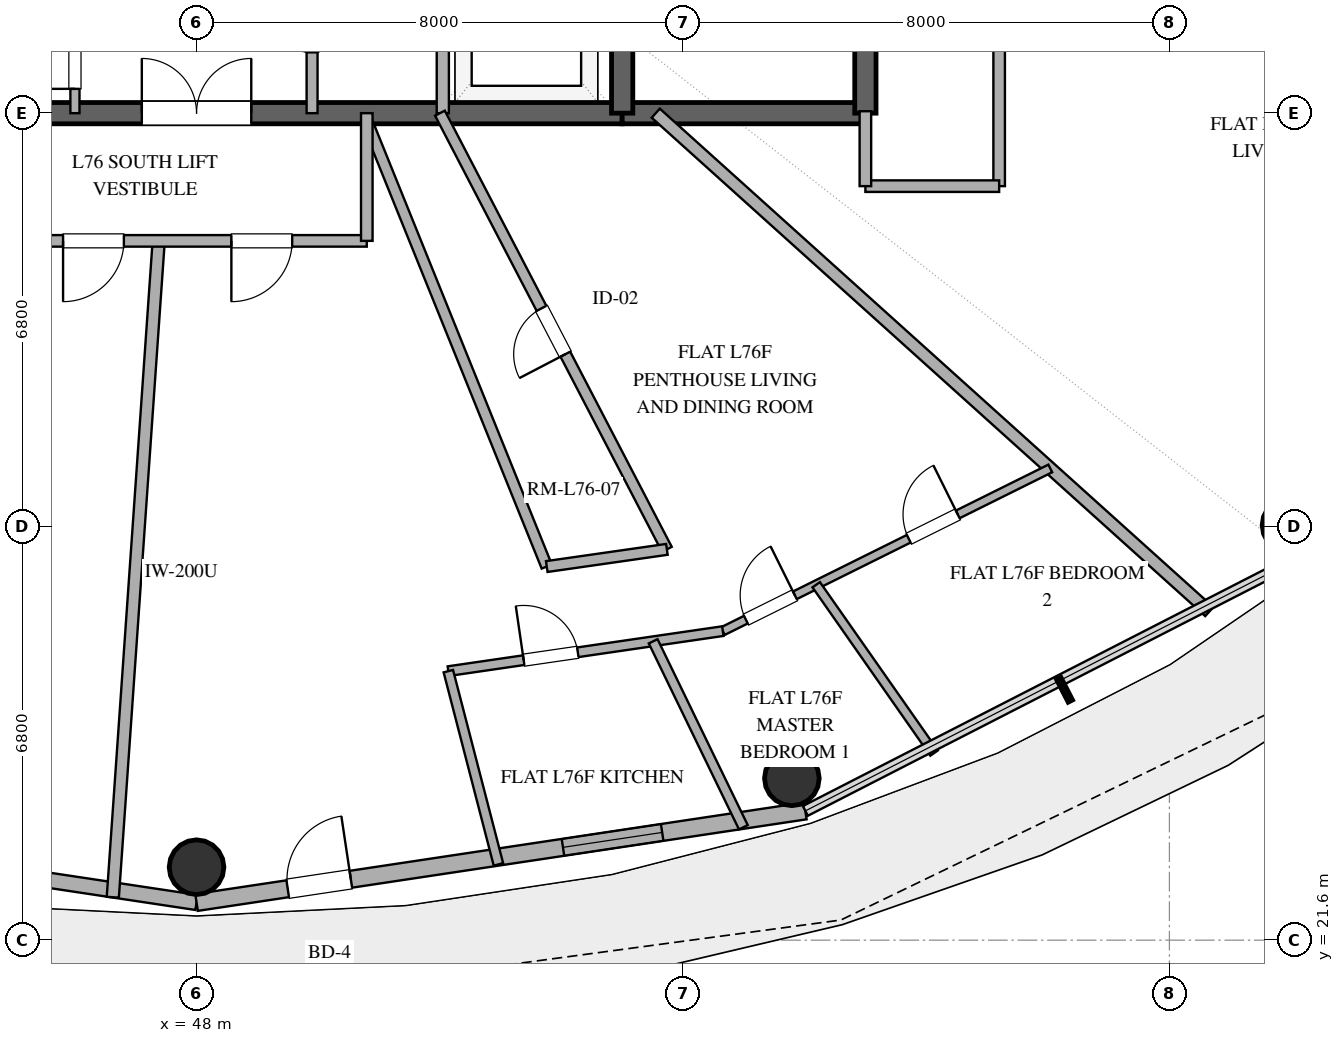
"""IFC4 building model, lengths in metres.
Left out: names, types, materials, properties, quantities, classifications, styles, units other than length and angle.
Written with IfcOpenShell. Run it as: python <this file> out.ifc"""

import sys

from ifc_helpers import new_model, si_unit, direction, frame, frame_2d, origin, origin_2d, place, context, subcontext, project, spatial, rectangle, hollow_circle, extrude, element, fill, save


model = new_model("IFC4")
c1 = context("Model", 3, precision=1e-05, world=origin(), true_north=direction((0.0, 1.0)))
c2 = subcontext(c1, "Body", "Model", "MODEL_VIEW")
j1 = project(units=[si_unit("LENGTHUNIT", "METRE"), si_unit("PLANEANGLEUNIT", "RADIAN")], contexts=[c1])
p1 = place(None, origin())
s1 = spatial("IfcSite", under=j1, at=p1, CompositionType="ELEMENT")
p2 = place(p1, origin())
s2 = spatial("IfcBuilding", under=s1, at=p2, CompositionType="ELEMENT")
p3 = place(p2, frame((0.0, 0.0, 294.6)))
s3 = spatial("IfcBuildingStorey", under=s2, at=p3, CompositionType="ELEMENT", Elevation=294.6)
p4 = place(p3, frame((41.0, 35.2, 0.0), z_axis=(0.0, 0.0, 1.0), x_axis=(1.0, 0.0, 0.0)))
e1 = element("IfcWall", 1, at=p4, inside=s3, PredefinedType="SHEAR", context=c2, shape_type="SweptSolid", body=[
    extrude(rectangle(XDim=14.0, YDim=0.35, at=frame_2d((7.0, 0.0))), origin(), (0.0, 0.0, 1.0), 3.37),
])
p5 = place(p4, frame((6.1, 0.0, 0.0)))
e2 = element("IfcOpeningElement", 2, at=p5, cuts=e1, PredefinedType="OPENING", context=c2, shape_type="SweptSolid", body=[
    extrude(rectangle(XDim=1.8, YDim=2.25, at=frame_2d((0.9, 1.125))), frame((0.0, 0.185, 0.0), z_axis=(0.0, -1.0, 0.0), x_axis=(1.0, 0.0, 0.0)), (0.0, 0.0, 1.0), 0.37),
])
p6 = place(p3, frame((55.0, 35.2, 0.0), z_axis=(0.0, 0.0, 1.0), x_axis=(1.0, 0.0, 0.0)))
e3 = element("IfcWall", 3, at=p6, inside=s3, PredefinedType="SHEAR", context=c2, shape_type="SweptSolid", body=[
    extrude(rectangle(XDim=4.0, YDim=0.35, at=frame_2d((2.0, 0.0))), origin(), (0.0, 0.0, 1.0), 3.37),
])
p7 = place(p3, frame((59.0, 35.2, 0.0), z_axis=(0.0, 0.0, 1.0), x_axis=(0.0, 1.0, 0.0)))
e4 = element("IfcWall", 4, at=p7, inside=s3, PredefinedType="SHEAR", context=c2, shape_type="SweptSolid", body=[
    extrude(rectangle(XDim=13.6, YDim=0.35, at=frame_2d((6.8, 0.0))), origin(), (0.0, 0.0, 1.0), 3.37),
])
p8 = place(p7, frame((1.5, 0.0, 0.0)))
e5 = element("IfcOpeningElement", 5, at=p8, cuts=e4, PredefinedType="OPENING", context=c2, shape_type="SweptSolid", body=[
    extrude(rectangle(XDim=1.2, YDim=2.15, at=frame_2d((0.6, 1.075))), frame((0.0, 0.185, 0.0), z_axis=(0.0, -1.0, 0.0), x_axis=(1.0, 0.0, 0.0)), (0.0, 0.0, 1.0), 0.37),
])
p9 = place(p3, frame((55.0, 35.2, 0.0), z_axis=(0.0, 0.0, 1.0), x_axis=(0.0, 1.0, 0.0)))
e6 = element("IfcWall", 6, at=p9, inside=s3, PredefinedType="SHEAR", context=c2, shape_type="SweptSolid", body=[
    extrude(rectangle(XDim=13.6, YDim=0.35, at=frame_2d((6.8, 0.0))), origin(), (0.0, 0.0, 1.0), 3.37),
])
p10 = place(p9, frame((1.15, 0.0, 0.0)))
e7 = element("IfcOpeningElement", 7, at=p10, cuts=e6, PredefinedType="OPENING", context=c2, shape_type="SweptSolid", body=[
    extrude(rectangle(XDim=1.1, YDim=2.2, at=frame_2d((0.55, 1.1))), frame((0.0, 0.185, 0.0), z_axis=(0.0, -1.0, 0.0), x_axis=(1.0, 0.0, 0.0)), (0.0, 0.0, 1.0), 0.37),
])
for number, where, z_axis, x_axis in (
    (8, (48.0, 22.8, 0.0), (0.0, 0.0, 1.0), (1.0, 0.0, 0.0)),
    (9, (57.791, 24.261, 0.0), (0.0, 0.0, 1.0), (1.0, 0.0, 0.0)),
    (10, (65.975, 28.424, 0.0), (0.0, 0.0, 1.0), (1.0, 0.0, 0.0)),
):
    element("IfcColumn", number, at=place(p3, frame(where, z_axis=z_axis, x_axis=x_axis)), inside=s3, PredefinedType="COLUMN", context=c2, shape_type="SweptSolid", body=[
        extrude(hollow_circle(Radius=0.45, WallThickness=0.025, at=origin_2d()), origin(), (0.0, 0.0, 1.0), 3.37),
    ])
p11 = place(p3, frame((37.987, 23.726, 0.0), z_axis=(0.0, 0.0, 1.0), x_axis=(0.988882522213, -0.148698881169, 0.0)))
e11 = element("IfcWall", 11, at=p11, inside=s3, PredefinedType="SOLIDWALL", context=c2, shape_type="SweptSolid", body=[
    extrude(rectangle(XDim=10.125, YDim=0.25, at=frame_2d((5.062, 0.0))), origin(), (0.0, 0.0, 1.0), 3.37),
])
p12 = place(p3, frame((48.0, 22.22, 0.0), z_axis=(0.0, 0.0, 1.0), x_axis=(0.988882522213, 0.148698881169, 0.0)))
e12 = element("IfcWall", 12, at=p12, inside=s3, PredefinedType="SOLIDWALL", context=c2, shape_type="SweptSolid", body=[
    extrude(rectangle(XDim=10.125, YDim=0.28, at=frame_2d((5.062, 0.0))), origin(), (0.0, 0.0, 1.0), 3.37),
])
p13 = place(p12, frame((1.516, 0.0, 0.0)))
e13 = element("IfcOpeningElement", 13, at=p13, cuts=e12, PredefinedType="OPENING", context=c2, shape_type="SweptSolid", body=[
    extrude(rectangle(XDim=1.05, YDim=2.2, at=frame_2d((0.525, 1.1))), frame((0.0, 0.15, 0.0), z_axis=(0.0, -1.0, 0.0), x_axis=(1.0, 0.0, 0.0)), (0.0, 0.0, 1.0), 0.3),
])
p14 = place(p12, frame((6.094, 0.0, 0.85)))
e14 = element("IfcOpeningElement", 14, at=p14, cuts=e12, PredefinedType="OPENING", context=c2, shape_type="SweptSolid", body=[
    extrude(rectangle(XDim=1.65, YDim=2.0, at=frame_2d((0.825, 1.0))), frame((0.0, 0.15, 0.0), z_axis=(0.0, -1.0, 0.0), x_axis=(1.0, 0.0, 0.0)), (0.0, 0.0, 1.0), 0.3),
])
p15 = place(p3, frame((52.05, 35.2, 0.0), z_axis=(0.0, 0.0, 1.0), x_axis=(0.0, 1.0, 0.0)))
e15 = element("IfcWall", 15, at=p15, inside=s3, PredefinedType="SOLIDWALL", context=c2, shape_type="SweptSolid", body=[
    extrude(rectangle(XDim=3.2, YDim=0.2, at=frame_2d((1.6, 0.0))), origin(), (0.0, 0.0, 1.0), 2.73),
])
p16 = place(p3, frame((46.0, 35.2, 0.0), z_axis=(0.0, 0.0, 1.0), x_axis=(0.0, 1.0, 0.0)))
e16 = element("IfcWall", 16, at=p16, inside=s3, PredefinedType="PARTITIONING", context=c2, shape_type="SweptSolid", body=[
    extrude(rectangle(XDim=3.2, YDim=0.15, at=frame_2d((1.6, 0.0))), origin(), (0.0, 0.0, 1.0), 2.73),
])
p17 = place(p16, frame((0.4, 0.0, 0.0)))
e17 = element("IfcOpeningElement", 17, at=p17, cuts=e16, PredefinedType="OPENING", context=c2, shape_type="SweptSolid", body=[
    extrude(rectangle(XDim=0.85, YDim=2.15, at=frame_2d((0.425, 1.075))), frame((0.0, 0.085, 0.0), z_axis=(0.0, -1.0, 0.0), x_axis=(1.0, 0.0, 0.0)), (0.0, 0.0, 1.0), 0.17),
])
p18 = place(p16, frame((1.85, 0.0, 0.0)))
e18 = element("IfcOpeningElement", 18, at=p18, cuts=e16, PredefinedType="OPENING", context=c2, shape_type="SweptSolid", body=[
    extrude(rectangle(XDim=0.85, YDim=2.15, at=frame_2d((0.425, 1.075))), frame((0.0, 0.085, 0.0), z_axis=(0.0, -1.0, 0.0), x_axis=(1.0, 0.0, 0.0)), (0.0, 0.0, 1.0), 0.17),
])
p19 = place(p3, frame((49.9, 35.2, 0.0), z_axis=(0.0, 0.0, 1.0), x_axis=(0.0, 1.0, 0.0)))
e19 = element("IfcWall", 19, at=p19, inside=s3, PredefinedType="PLUMBINGWALL", context=c2, shape_type="SweptSolid", body=[
    extrude(rectangle(XDim=3.0, YDim=0.18, at=frame_2d((1.5, 0.0))), origin(), (0.0, 0.0, 1.0), 2.73),
])
p20 = place(p19, frame((1.0, 0.0, 0.0)))
e20 = element("IfcOpeningElement", 20, at=p20, cuts=e19, PredefinedType="OPENING", context=c2, shape_type="SweptSolid", body=[
    extrude(rectangle(XDim=0.9, YDim=2.1, at=frame_2d((0.45, 1.05))), frame((0.0, 0.1, 0.0), z_axis=(0.0, -1.0, 0.0), x_axis=(1.0, 0.0, 0.0)), (0.0, 0.0, 1.0), 0.2),
])
p21 = place(p3, frame((47.378, 33.1, 0.0), z_axis=(0.0, 0.0, 1.0), x_axis=(-0.069765360577, -0.997563428792, 0.0)))
e21 = element("IfcWall", 21, at=p21, inside=s3, PredefinedType="PARTITIONING", context=c2, shape_type="SweptSolid", body=[
    extrude(rectangle(XDim=10.82, YDim=0.2, at=frame_2d((5.41, 0.0))), origin(), (0.0, 0.0, 1.0), 2.73),
])
p22 = place(p3, frame((64.656, 27.003, 0.0), z_axis=(0.0, 0.0, 1.0), x_axis=(-0.743146474593, 0.669128774826, 0.0)))
e22 = element("IfcWall", 22, at=p22, inside=s3, PredefinedType="PARTITIONING", context=c2, shape_type="SweptSolid", body=[
    extrude(rectangle(XDim=12.25, YDim=0.2, at=frame_2d((6.125, 0.0))), origin(), (0.0, 0.0, 1.0), 2.73),
])
p23 = place(p3, frame((55.736, 28.027, 0.0), z_axis=(0.0, 0.0, 1.0), x_axis=(-0.461598928477, 0.88708873808, 0.0)))
e23 = element("IfcWall", 23, at=p23, inside=s3, PredefinedType="PLUMBINGWALL", context=c2, shape_type="SweptSolid", body=[
    extrude(rectangle(XDim=8.086, YDim=0.18, at=frame_2d((4.043, 0.0))), origin(), (0.0, 0.0, 1.0), 2.73),
])
p24 = place(p23, frame((3.618, 0.0, 0.0)))
e24 = element("IfcOpeningElement", 24, at=p24, cuts=e23, PredefinedType="OPENING", context=c2, shape_type="SweptSolid", body=[
    extrude(rectangle(XDim=0.85, YDim=2.1, at=frame_2d((0.425, 1.05))), frame((0.0, 0.1, 0.0), z_axis=(0.0, -1.0, 0.0), x_axis=(1.0, 0.0, 0.0)), (0.0, 0.0, 1.0), 0.2),
])
p25 = place(p3, frame((50.8, 35.07, 0.0), z_axis=(0.0, 0.0, 1.0), x_axis=(0.374600990238, -0.927186118378, 0.0)))
e25 = element("IfcWall", 25, at=p25, inside=s3, PredefinedType="PLUMBINGWALL", context=c2, shape_type="SweptSolid", body=[
    extrude(rectangle(XDim=7.901, YDim=0.18, at=frame_2d((3.95, 0.0))), origin(), (0.0, 0.0, 1.0), 2.73),
])
p26 = place(p3, frame((61.2, 45.252, 0.0), z_axis=(0.0, 0.0, 1.0), x_axis=(0.0, -1.0, 0.0)))
e26 = element("IfcWall", 26, at=p26, inside=s3, PredefinedType="PARTITIONING", context=c2, shape_type="SweptSolid", body=[
    extrude(rectangle(XDim=11.252, YDim=0.19, at=frame_2d((5.626, 0.0))), origin(), (0.0, 0.0, 1.0), 2.73),
])
p27 = place(p26, frame((7.871, 0.0, 0.0)))
e27 = element("IfcOpeningElement", 27, at=p27, cuts=e26, PredefinedType="OPENING", context=c2, shape_type="SweptSolid", body=[
    extrude(rectangle(XDim=1.0, YDim=2.2, at=frame_2d((0.5, 1.1))), frame((0.0, 0.105, 0.0), z_axis=(0.0, -1.0, 0.0), x_axis=(1.0, 0.0, 0.0)), (0.0, 0.0, 1.0), 0.21),
])
p28 = place(p3, frame((56.655, 26.682, 0.0), z_axis=(0.0, 0.0, 1.0), x_axis=(0.895585218268, 0.444890005304, 0.0)))
e28 = element("IfcWall", 28, at=p28, inside=s3, PredefinedType="PARTITIONING", context=c2, shape_type="SweptSolid", body=[
    extrude(rectangle(XDim=6.014, YDim=0.14, at=frame_2d((3.007, 0.0))), origin(), (0.0, 0.0, 1.0), 2.73),
])
p29 = place(p28, frame((3.415, 0.0, 0.0)))
e29 = element("IfcOpeningElement", 29, at=p29, cuts=e28, PredefinedType="OPENING", context=c2, shape_type="SweptSolid", body=[
    extrude(rectangle(XDim=0.9, YDim=2.1, at=frame_2d((0.45, 1.05))), frame((0.0, 0.08, 0.0), z_axis=(0.0, -1.0, 0.0), x_axis=(1.0, 0.0, 0.0)), (0.0, 0.0, 1.0), 0.16),
])
p30 = place(p28, frame((0.424, 0.0, 0.0)))
e30 = element("IfcOpeningElement", 30, at=p30, cuts=e28, PredefinedType="OPENING", context=c2, shape_type="SweptSolid", body=[
    extrude(rectangle(XDim=0.9, YDim=2.1, at=frame_2d((0.45, 1.05))), frame((0.0, 0.08, 0.0), z_axis=(0.0, -1.0, 0.0), x_axis=(1.0, 0.0, 0.0)), (0.0, 0.0, 1.0), 0.16),
])
p31 = place(p3, frame((50.8, 33.1, 0.0), z_axis=(0.0, 0.0, 1.0), x_axis=(-1.0, 0.0, 0.0)))
e31 = element("IfcWall", 31, at=p31, inside=s3, PredefinedType="PARTITIONING", context=c2, shape_type="SweptSolid", body=[
    extrude(rectangle(XDim=5.6, YDim=0.19, at=frame_2d((2.8, 0.0))), origin(), (0.0, 0.0, 1.0), 2.73),
])
p32 = place(p31, frame((1.227, 0.0, 0.0)))
e32 = element("IfcOpeningElement", 32, at=p32, cuts=e31, PredefinedType="OPENING", context=c2, shape_type="SweptSolid", body=[
    extrude(rectangle(XDim=1.0, YDim=2.2, at=frame_2d((0.5, 1.1))), frame((0.0, 0.105, 0.0), z_axis=(0.0, -1.0, 0.0), x_axis=(1.0, 0.0, 0.0)), (0.0, 0.0, 1.0), 0.21),
])
p33 = place(p31, frame((3.995, 0.0, 0.0)))
e33 = element("IfcOpeningElement", 33, at=p33, cuts=e31, PredefinedType="OPENING", context=c2, shape_type="SweptSolid", body=[
    extrude(rectangle(XDim=1.0, YDim=2.2, at=frame_2d((0.5, 1.1))), frame((0.0, 0.105, 0.0), z_axis=(0.0, -1.0, 0.0), x_axis=(1.0, 0.0, 0.0)), (0.0, 0.0, 1.0), 0.21),
])
p34 = place(p3, frame((52.141, 26.024, 0.0), z_axis=(0.0, 0.0, 1.0), x_axis=(0.989534254842, 0.144298158322, 0.0)))
e34 = element("IfcWall", 34, at=p34, inside=s3, PredefinedType="PLUMBINGWALL", context=c2, shape_type="SweptSolid", body=[
    extrude(rectangle(XDim=4.562, YDim=0.16, at=frame_2d((2.281, 0.0))), origin(), (0.0, 0.0, 1.0), 2.73),
])
p35 = place(p34, frame((1.252, 0.0, 0.0)))
e35 = element("IfcOpeningElement", 35, at=p35, cuts=e34, PredefinedType="OPENING", context=c2, shape_type="SweptSolid", body=[
    extrude(rectangle(XDim=0.9, YDim=2.1, at=frame_2d((0.45, 1.05))), frame((0.0, 0.09, 0.0), z_axis=(0.0, -1.0, 0.0), x_axis=(1.0, 0.0, 0.0)), (0.0, 0.0, 1.0), 0.18),
])
p36 = place(p3, frame((55.51, 26.515, 0.0), z_axis=(0.0, 0.0, 1.0), x_axis=(0.436379231312, -0.899762839019, 0.0)))
e36 = element("IfcWall", 36, at=p36, inside=s3, PredefinedType="PLUMBINGWALL", context=c2, shape_type="SweptSolid", body=[
    extrude(rectangle(XDim=3.399, YDim=0.16, at=frame_2d((1.7, 0.0))), origin(), (0.0, 0.0, 1.0), 2.73),
])
p37 = place(p3, frame((58.191, 27.445, 0.0), z_axis=(0.0, 0.0, 1.0), x_axis=(0.573559302344, -0.819164041383, 0.0)))
e37 = element("IfcWall", 37, at=p37, inside=s3, PredefinedType="PARTITIONING", context=c2, shape_type="SweptSolid", body=[
    extrude(rectangle(XDim=3.38, YDim=0.15, at=frame_2d((1.69, 0.0))), origin(), (0.0, 0.0, 1.0), 2.73),
])
p38 = place(p3, frame((52.965, 22.846, 0.0), z_axis=(0.0, 0.0, 1.0), x_axis=(-0.250907961693, 0.968010947644, 0.0)))
e38 = element("IfcWall", 38, at=p38, inside=s3, PredefinedType="PLUMBINGWALL", context=c2, shape_type="SweptSolid", body=[
    extrude(rectangle(XDim=3.283, YDim=0.16, at=frame_2d((1.642, 0.0))), origin(), (0.0, 0.0, 1.0), 2.73),
])
p39 = place(p3, frame((61.2, 34.0, 0.0), z_axis=(0.0, 0.0, 1.0), x_axis=(-1.0, 0.0, 0.0)))
e39 = element("IfcWall", 39, at=p39, inside=s3, PredefinedType="PARTITIONING", context=c2, shape_type="SweptSolid", body=[
    extrude(rectangle(XDim=2.2, YDim=0.19, at=frame_2d((1.1, 0.0))), origin(), (0.0, 0.0, 1.0), 2.73),
])
p40 = place(p3, frame((50.8, 35.2, 0.0), z_axis=(0.0, 0.0, 1.0), x_axis=(0.0, -1.0, 0.0)))
e40 = element("IfcWall", 40, at=p40, inside=s3, PredefinedType="PARTITIONING", context=c2, shape_type="SweptSolid", body=[
    extrude(rectangle(XDim=2.1, YDim=0.19, at=frame_2d((1.05, 0.0))), origin(), (0.0, 0.0, 1.0), 2.73),
])
p41 = place(p3, frame((53.76, 27.744, 0.0), z_axis=(0.0, 0.0, 1.0), x_axis=(0.989917666011, 0.141643970992, 0.0)))
e41 = element("IfcWall", 41, at=p41, inside=s3, PredefinedType="PLUMBINGWALL", context=c2, shape_type="SweptSolid", body=[
    extrude(rectangle(XDim=1.996, YDim=0.18, at=frame_2d((0.998, 0.0))), origin(), (0.0, 0.0, 1.0), 2.73),
])
p42 = place(p3, frame((59.0, 34.0, 0.0), z_axis=(0.0, 0.0, 1.0), x_axis=(0.0, 1.0, 0.0)))
e42 = element("IfcWall", 42, at=p42, inside=s3, PredefinedType="PARTITIONING", context=c2, shape_type="SweptSolid", body=[
    extrude(rectangle(XDim=1.232, YDim=0.19, at=frame_2d((0.616, 0.0))), origin(), (0.0, 0.0, 1.0), 2.73),
])
p43 = place(p13, origin())
e43 = element("IfcDoor", 43, at=p43, inside=s3, OperationType="SINGLE_SWING_RIGHT", PredefinedType="DOOR", context=c2, shape_type="SweptSolid", body=[
    extrude(rectangle(XDim=1.05, YDim=2.2, at=frame_2d((0.525, 1.1))), frame((0.0, 0.025, 0.0), z_axis=(0.0, -1.0, 0.0), x_axis=(1.0, 0.0, 0.0)), (0.0, 0.0, 1.0), 0.05),
])
fill(e13, e43)
p44 = place(p14, origin())
e44 = element("IfcWindow", 44, at=p44, inside=s3, PartitioningType="SINGLE_PANEL", PredefinedType="WINDOW", context=c2, shape_type="SweptSolid", body=[
    extrude(rectangle(XDim=1.65, YDim=2.0, at=frame_2d((0.825, 1.0))), frame((0.0, 0.03, 0.0), z_axis=(0.0, -1.0, 0.0), x_axis=(1.0, 0.0, 0.0)), (0.0, 0.0, 1.0), 0.06),
])
fill(e14, e44)
p45 = place(p5, origin())
e45 = element("IfcDoor", 45, at=p45, inside=s3, OperationType="DOUBLE_DOOR_SINGLE_SWING", PredefinedType="DOOR", context=c2, shape_type="SweptSolid", body=[
    extrude(rectangle(XDim=1.8, YDim=2.25, at=frame_2d((0.9, 1.125))), frame((0.0, 0.025, 0.0), z_axis=(0.0, -1.0, 0.0), x_axis=(1.0, 0.0, 0.0)), (0.0, 0.0, 1.0), 0.05),
])
fill(e2, e45)
p46 = place(p17, origin())
e46 = element("IfcDoor", 46, at=p46, inside=s3, OperationType="SINGLE_SWING_LEFT", PredefinedType="DOOR", context=c2, shape_type="SweptSolid", body=[
    extrude(rectangle(XDim=0.85, YDim=2.15, at=frame_2d((0.425, 1.075))), frame((0.0, 0.025, 0.0), z_axis=(0.0, -1.0, 0.0), x_axis=(1.0, 0.0, 0.0)), (0.0, 0.0, 1.0), 0.05),
])
fill(e17, e46)
p47 = place(p24, origin())
e47 = element("IfcDoor", 47, at=p47, inside=s3, OperationType="SINGLE_SWING_LEFT", PredefinedType="DOOR", context=c2, shape_type="SweptSolid", body=[
    extrude(rectangle(XDim=0.85, YDim=2.1, at=frame_2d((0.425, 1.05))), frame((0.0, 0.025, 0.0), z_axis=(0.0, -1.0, 0.0), x_axis=(1.0, 0.0, 0.0)), (0.0, 0.0, 1.0), 0.05),
])
fill(e24, e47)
p48 = place(p29, origin())
e48 = element("IfcDoor", 48, at=p48, inside=s3, OperationType="SINGLE_SWING_RIGHT", PredefinedType="DOOR", context=c2, shape_type="SweptSolid", body=[
    extrude(rectangle(XDim=0.9, YDim=2.1, at=frame_2d((0.45, 1.05))), frame((0.0, 0.025, 0.0), z_axis=(0.0, -1.0, 0.0), x_axis=(1.0, 0.0, 0.0)), (0.0, 0.0, 1.0), 0.05),
])
fill(e29, e48)
p49 = place(p30, origin())
e49 = element("IfcDoor", 49, at=p49, inside=s3, OperationType="SINGLE_SWING_RIGHT", PredefinedType="DOOR", context=c2, shape_type="SweptSolid", body=[
    extrude(rectangle(XDim=0.9, YDim=2.1, at=frame_2d((0.45, 1.05))), frame((0.0, 0.025, 0.0), z_axis=(0.0, -1.0, 0.0), x_axis=(1.0, 0.0, 0.0)), (0.0, 0.0, 1.0), 0.05),
])
fill(e30, e49)
p50 = place(p32, origin())
e50 = element("IfcDoor", 50, at=p50, inside=s3, OperationType="SINGLE_SWING_RIGHT", PredefinedType="DOOR", context=c2, shape_type="SweptSolid", body=[
    extrude(rectangle(XDim=1.0, YDim=2.2, at=frame_2d((0.5, 1.1))), frame((0.0, 0.025, 0.0), z_axis=(0.0, -1.0, 0.0), x_axis=(1.0, 0.0, 0.0)), (0.0, 0.0, 1.0), 0.05),
])
fill(e32, e50)
p51 = place(p33, origin())
e51 = element("IfcDoor", 51, at=p51, inside=s3, OperationType="SINGLE_SWING_RIGHT", PredefinedType="DOOR", context=c2, shape_type="SweptSolid", body=[
    extrude(rectangle(XDim=1.0, YDim=2.2, at=frame_2d((0.5, 1.1))), frame((0.0, 0.025, 0.0), z_axis=(0.0, -1.0, 0.0), x_axis=(1.0, 0.0, 0.0)), (0.0, 0.0, 1.0), 0.05),
])
fill(e33, e51)
p52 = place(p35, origin())
e52 = element("IfcDoor", 52, at=p52, inside=s3, OperationType="SINGLE_SWING_LEFT", PredefinedType="DOOR", context=c2, shape_type="SweptSolid", body=[
    extrude(rectangle(XDim=0.9, YDim=2.1, at=frame_2d((0.45, 1.05))), frame((0.0, 0.025, 0.0), z_axis=(0.0, -1.0, 0.0), x_axis=(1.0, 0.0, 0.0)), (0.0, 0.0, 1.0), 0.05),
])
fill(e35, e52)
save(model, sys.argv[1])
